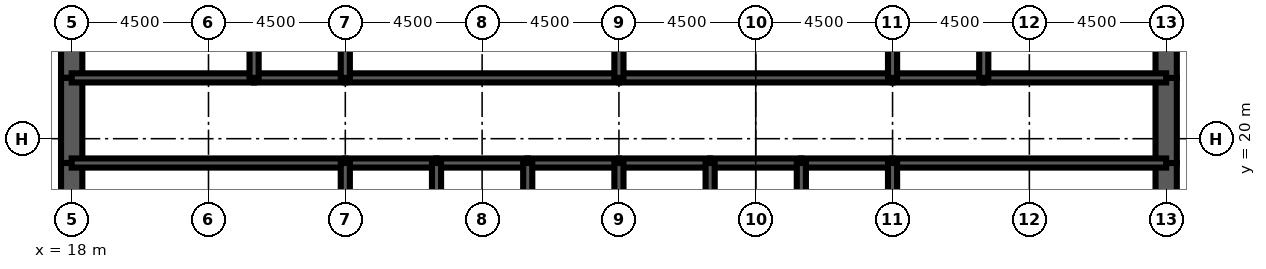
"""IFC4 building model, lengths in metres.
Left out: names, types, materials, properties, quantities, classifications, styles, units other than length and angle.
Written with IfcOpenShell. Run it as: python <this file> out.ifc"""

import sys

from ifc_helpers import new_model, si_unit, direction, frame, frame_2d, origin, place, context, subcontext, project, spatial, rectangle, extrude, element, fill, save


model = new_model("IFC4")
c1 = context("Model", 3, precision=1e-05, world=origin(), true_north=direction((0.0, 1.0)))
c2 = subcontext(c1, "Body", "Model", "MODEL_VIEW")
j1 = project(units=[si_unit("LENGTHUNIT", "METRE"), si_unit("PLANEANGLEUNIT", "RADIAN")], contexts=[c1])
p1 = place(None, origin())
s1 = spatial("IfcSite", under=j1, at=p1, CompositionType="ELEMENT")
p2 = place(p1, origin())
s2 = spatial("IfcBuilding", under=s1, at=p2, CompositionType="ELEMENT")
p3 = place(p2, frame((0.0, 0.0, 292.1)))
s3 = spatial("IfcBuildingStorey", under=s2, at=p3, CompositionType="ELEMENT", Elevation=292.1)
p4 = place(p3, frame((18.0, 26.0, 0.0), z_axis=(0.0, 0.0, 1.0), x_axis=(0.0, -1.0, 0.0)))
e1 = element("IfcWall", 1, at=p4, inside=s3, PredefinedType="SHEAR", context=c2, shape_type="SweptSolid", body=[
    extrude(rectangle(XDim=4.0, YDim=0.7, at=frame_2d((2.0, 0.0))), origin(), (0.0, 0.0, 1.0), 4.2),
])
p5 = place(p3, frame((18.0, 22.0, 0.0), z_axis=(0.0, 0.0, 1.0), x_axis=(0.0, -1.0, 0.0)))
e2 = element("IfcWall", 2, at=p5, inside=s3, PredefinedType="SHEAR", context=c2, shape_type="SweptSolid", body=[
    extrude(rectangle(XDim=2.8, YDim=0.7, at=frame_2d((1.4, 0.0))), origin(), (0.0, 0.0, 1.0), 4.2),
])
p6 = place(p5, frame((0.6, 0.0, 0.0)))
e3 = element("IfcOpeningElement", 3, at=p6, cuts=e2, PredefinedType="OPENING", context=c2, shape_type="SweptSolid", body=[
    extrude(rectangle(XDim=1.8, YDim=2.1, at=frame_2d((0.9, 1.05))), frame((0.0, 0.36, 0.0), z_axis=(0.0, -1.0, 0.0), x_axis=(1.0, 0.0, 0.0)), (0.0, 0.0, 1.0), 0.72),
])
for number, where, z_axis, x_axis in (
    (4, (18.0, 19.2, 0.0), (0.0, 0.0, 1.0), (0.0, -1.0, 0.0)),
    (5, (54.0, 16.0, 0.0), (0.0, 0.0, 1.0), (0.0, 1.0, 0.0)),
):
    element("IfcWall", number, at=place(p3, frame(where, z_axis=z_axis, x_axis=x_axis)), inside=s3, PredefinedType="SHEAR", context=c2, shape_type="SweptSolid", body=[
        extrude(rectangle(XDim=3.2, YDim=0.7, at=frame_2d((1.6, 0.0))), origin(), (0.0, 0.0, 1.0), 4.2),
    ])
p7 = place(p3, frame((54.0, 19.2, 0.0), z_axis=(0.0, 0.0, 1.0), x_axis=(0.0, 1.0, 0.0)))
e6 = element("IfcWall", 6, at=p7, inside=s3, PredefinedType="SHEAR", context=c2, shape_type="SweptSolid", body=[
    extrude(rectangle(XDim=2.8, YDim=0.7, at=frame_2d((1.4, 0.0))), origin(), (0.0, 0.0, 1.0), 4.2),
])
p8 = place(p7, frame((0.4, 0.0, 0.0)))
e7 = element("IfcOpeningElement", 7, at=p8, cuts=e6, PredefinedType="OPENING", context=c2, shape_type="SweptSolid", body=[
    extrude(rectangle(XDim=1.8, YDim=2.1, at=frame_2d((0.9, 1.05))), frame((0.0, 0.36, 0.0), z_axis=(0.0, -1.0, 0.0), x_axis=(1.0, 0.0, 0.0)), (0.0, 0.0, 1.0), 0.72),
])
p9 = place(p3, frame((54.0, 22.0, 0.0), z_axis=(0.0, 0.0, 1.0), x_axis=(0.0, 1.0, 0.0)))
e8 = element("IfcWall", 8, at=p9, inside=s3, PredefinedType="SHEAR", context=c2, shape_type="SweptSolid", body=[
    extrude(rectangle(XDim=4.0, YDim=0.7, at=frame_2d((2.0, 0.0))), origin(), (0.0, 0.0, 1.0), 4.2),
])
p10 = place(p3, frame((18.0, 19.2, 0.0), z_axis=(0.0, 0.0, 1.0), x_axis=(1.0, 0.0, 0.0)))
e9 = element("IfcWall", 9, at=p10, inside=s3, PredefinedType="SOLIDWALL", context=c2, shape_type="SweptSolid", body=[
    extrude(rectangle(XDim=9.0, YDim=0.3, at=frame_2d((4.5, 0.0))), origin(), (0.0, 0.0, 1.0), 4.2),
])
p11 = place(p10, frame((0.65, 0.0, 0.0)))
e10 = element("IfcOpeningElement", 10, at=p11, cuts=e9, PredefinedType="OPENING", context=c2, shape_type="SweptSolid", body=[
    extrude(rectangle(XDim=1.0, YDim=2.1, at=frame_2d((0.5, 1.05))), frame((0.0, 0.16, 0.0), z_axis=(0.0, -1.0, 0.0), x_axis=(1.0, 0.0, 0.0)), (0.0, 0.0, 1.0), 0.32),
])
p12 = place(p3, frame((27.0, 19.2, 0.0), z_axis=(0.0, 0.0, 1.0), x_axis=(1.0, 0.0, 0.0)))
e11 = element("IfcWall", 11, at=p12, inside=s3, PredefinedType="SOLIDWALL", context=c2, shape_type="SweptSolid", body=[
    extrude(rectangle(XDim=3.0, YDim=0.3, at=frame_2d((1.5, 0.0))), origin(), (0.0, 0.0, 1.0), 4.2),
])
p13 = place(p12, frame((0.95, 0.0, 0.0)))
e12 = element("IfcOpeningElement", 12, at=p13, cuts=e11, PredefinedType="OPENING", context=c2, shape_type="SweptSolid", body=[
    extrude(rectangle(XDim=1.1, YDim=2.2, at=frame_2d((0.55, 1.1))), frame((0.0, 0.16, 0.0), z_axis=(0.0, -1.0, 0.0), x_axis=(1.0, 0.0, 0.0)), (0.0, 0.0, 1.0), 0.32),
])
p14 = place(p3, frame((30.0, 19.2, 0.0), z_axis=(0.0, 0.0, 1.0), x_axis=(1.0, 0.0, 0.0)))
e13 = element("IfcWall", 13, at=p14, inside=s3, PredefinedType="SOLIDWALL", context=c2, shape_type="SweptSolid", body=[
    extrude(rectangle(XDim=3.0, YDim=0.3, at=frame_2d((1.5, 0.0))), origin(), (0.0, 0.0, 1.0), 4.2),
])
p15 = place(p14, frame((0.95, 0.0, 0.0)))
e14 = element("IfcOpeningElement", 14, at=p15, cuts=e13, PredefinedType="OPENING", context=c2, shape_type="SweptSolid", body=[
    extrude(rectangle(XDim=1.1, YDim=2.2, at=frame_2d((0.55, 1.1))), frame((0.0, 0.16, 0.0), z_axis=(0.0, -1.0, 0.0), x_axis=(1.0, 0.0, 0.0)), (0.0, 0.0, 1.0), 0.32),
])
p16 = place(p3, frame((33.0, 19.2, 0.0), z_axis=(0.0, 0.0, 1.0), x_axis=(1.0, 0.0, 0.0)))
e15 = element("IfcWall", 15, at=p16, inside=s3, PredefinedType="SOLIDWALL", context=c2, shape_type="SweptSolid", body=[
    extrude(rectangle(XDim=3.0, YDim=0.3, at=frame_2d((1.5, 0.0))), origin(), (0.0, 0.0, 1.0), 4.2),
])
p17 = place(p16, frame((0.95, 0.0, 0.0)))
e16 = element("IfcOpeningElement", 16, at=p17, cuts=e15, PredefinedType="OPENING", context=c2, shape_type="SweptSolid", body=[
    extrude(rectangle(XDim=1.1, YDim=2.2, at=frame_2d((0.55, 1.1))), frame((0.0, 0.16, 0.0), z_axis=(0.0, -1.0, 0.0), x_axis=(1.0, 0.0, 0.0)), (0.0, 0.0, 1.0), 0.32),
])
p18 = place(p3, frame((36.0, 19.2, 0.0), z_axis=(0.0, 0.0, 1.0), x_axis=(1.0, 0.0, 0.0)))
e17 = element("IfcWall", 17, at=p18, inside=s3, PredefinedType="SOLIDWALL", context=c2, shape_type="SweptSolid", body=[
    extrude(rectangle(XDim=3.0, YDim=0.3, at=frame_2d((1.5, 0.0))), origin(), (0.0, 0.0, 1.0), 4.2),
])
p19 = place(p18, frame((0.95, 0.0, 0.0)))
e18 = element("IfcOpeningElement", 18, at=p19, cuts=e17, PredefinedType="OPENING", context=c2, shape_type="SweptSolid", body=[
    extrude(rectangle(XDim=1.1, YDim=2.2, at=frame_2d((0.55, 1.1))), frame((0.0, 0.16, 0.0), z_axis=(0.0, -1.0, 0.0), x_axis=(1.0, 0.0, 0.0)), (0.0, 0.0, 1.0), 0.32),
])
p20 = place(p3, frame((39.0, 19.2, 0.0), z_axis=(0.0, 0.0, 1.0), x_axis=(1.0, 0.0, 0.0)))
e19 = element("IfcWall", 19, at=p20, inside=s3, PredefinedType="SOLIDWALL", context=c2, shape_type="SweptSolid", body=[
    extrude(rectangle(XDim=3.0, YDim=0.3, at=frame_2d((1.5, 0.0))), origin(), (0.0, 0.0, 1.0), 4.2),
])
p21 = place(p20, frame((1.0, 0.0, 0.0)))
e20 = element("IfcOpeningElement", 20, at=p21, cuts=e19, PredefinedType="OPENING", context=c2, shape_type="SweptSolid", body=[
    extrude(rectangle(XDim=1.0, YDim=2.1, at=frame_2d((0.5, 1.05))), frame((0.0, 0.16, 0.0), z_axis=(0.0, -1.0, 0.0), x_axis=(1.0, 0.0, 0.0)), (0.0, 0.0, 1.0), 0.32),
])
p22 = place(p3, frame((42.0, 19.2, 0.0), z_axis=(0.0, 0.0, 1.0), x_axis=(1.0, 0.0, 0.0)))
e21 = element("IfcWall", 21, at=p22, inside=s3, PredefinedType="SOLIDWALL", context=c2, shape_type="SweptSolid", body=[
    extrude(rectangle(XDim=3.0, YDim=0.3, at=frame_2d((1.5, 0.0))), origin(), (0.0, 0.0, 1.0), 4.2),
])
p23 = place(p22, frame((1.0, 0.0, 0.0)))
e22 = element("IfcOpeningElement", 22, at=p23, cuts=e21, PredefinedType="OPENING", context=c2, shape_type="SweptSolid", body=[
    extrude(rectangle(XDim=1.0, YDim=2.1, at=frame_2d((0.5, 1.05))), frame((0.0, 0.16, 0.0), z_axis=(0.0, -1.0, 0.0), x_axis=(1.0, 0.0, 0.0)), (0.0, 0.0, 1.0), 0.32),
])
p24 = place(p3, frame((45.0, 19.2, 0.0), z_axis=(0.0, 0.0, 1.0), x_axis=(1.0, 0.0, 0.0)))
e23 = element("IfcWall", 23, at=p24, inside=s3, PredefinedType="SOLIDWALL", context=c2, shape_type="SweptSolid", body=[
    extrude(rectangle(XDim=9.0, YDim=0.3, at=frame_2d((4.5, 0.0))), origin(), (0.0, 0.0, 1.0), 4.2),
])
p25 = place(p24, frame((7.35, 0.0, 0.0)))
e24 = element("IfcOpeningElement", 24, at=p25, cuts=e23, PredefinedType="OPENING", context=c2, shape_type="SweptSolid", body=[
    extrude(rectangle(XDim=1.0, YDim=2.1, at=frame_2d((0.5, 1.05))), frame((0.0, 0.16, 0.0), z_axis=(0.0, -1.0, 0.0), x_axis=(1.0, 0.0, 0.0)), (0.0, 0.0, 1.0), 0.32),
])
p26 = place(p3, frame((18.0, 22.0, 0.0), z_axis=(0.0, 0.0, 1.0), x_axis=(1.0, 0.0, 0.0)))
e25 = element("IfcWall", 25, at=p26, inside=s3, PredefinedType="SOLIDWALL", context=c2, shape_type="SweptSolid", body=[
    extrude(rectangle(XDim=6.0, YDim=0.3, at=frame_2d((3.0, 0.0))), origin(), (0.0, 0.0, 1.0), 4.2),
])
p27 = place(p26, frame((2.0, 0.0, 0.0)))
e26 = element("IfcOpeningElement", 26, at=p27, cuts=e25, PredefinedType="OPENING", context=c2, shape_type="SweptSolid", body=[
    extrude(rectangle(XDim=1.0, YDim=2.1, at=frame_2d((0.5, 1.05))), frame((0.0, 0.16, 0.0), z_axis=(0.0, -1.0, 0.0), x_axis=(1.0, 0.0, 0.0)), (0.0, 0.0, 1.0), 0.32),
])
p28 = place(p3, frame((24.0, 22.0, 0.0), z_axis=(0.0, 0.0, 1.0), x_axis=(1.0, 0.0, 0.0)))
e27 = element("IfcWall", 27, at=p28, inside=s3, PredefinedType="SOLIDWALL", context=c2, shape_type="SweptSolid", body=[
    extrude(rectangle(XDim=3.0, YDim=0.3, at=frame_2d((1.5, 0.0))), origin(), (0.0, 0.0, 1.0), 4.2),
])
p29 = place(p28, frame((1.0, 0.0, 0.0)))
e28 = element("IfcOpeningElement", 28, at=p29, cuts=e27, PredefinedType="OPENING", context=c2, shape_type="SweptSolid", body=[
    extrude(rectangle(XDim=1.0, YDim=2.1, at=frame_2d((0.5, 1.05))), frame((0.0, 0.16, 0.0), z_axis=(0.0, -1.0, 0.0), x_axis=(1.0, 0.0, 0.0)), (0.0, 0.0, 1.0), 0.32),
])
p30 = place(p3, frame((27.0, 22.0, 0.0), z_axis=(0.0, 0.0, 1.0), x_axis=(1.0, 0.0, 0.0)))
e29 = element("IfcWall", 29, at=p30, inside=s3, PredefinedType="SOLIDWALL", context=c2, shape_type="SweptSolid", body=[
    extrude(rectangle(XDim=9.0, YDim=0.3, at=frame_2d((4.5, 0.0))), origin(), (0.0, 0.0, 1.0), 4.2),
])
p31 = place(p30, frame((4.0, 0.0, 0.0)))
e30 = element("IfcOpeningElement", 30, at=p31, cuts=e29, PredefinedType="OPENING", context=c2, shape_type="SweptSolid", body=[
    extrude(rectangle(XDim=1.0, YDim=2.1, at=frame_2d((0.5, 1.05))), frame((0.0, 0.16, 0.0), z_axis=(0.0, -1.0, 0.0), x_axis=(1.0, 0.0, 0.0)), (0.0, 0.0, 1.0), 0.32),
])
p32 = place(p3, frame((36.0, 22.0, 0.0), z_axis=(0.0, 0.0, 1.0), x_axis=(1.0, 0.0, 0.0)))
e31 = element("IfcWall", 31, at=p32, inside=s3, PredefinedType="SOLIDWALL", context=c2, shape_type="SweptSolid", body=[
    extrude(rectangle(XDim=9.0, YDim=0.3, at=frame_2d((4.5, 0.0))), origin(), (0.0, 0.0, 1.0), 4.2),
])
p33 = place(p32, frame((4.0, 0.0, 0.0)))
e32 = element("IfcOpeningElement", 32, at=p33, cuts=e31, PredefinedType="OPENING", context=c2, shape_type="SweptSolid", body=[
    extrude(rectangle(XDim=1.0, YDim=2.1, at=frame_2d((0.5, 1.05))), frame((0.0, 0.16, 0.0), z_axis=(0.0, -1.0, 0.0), x_axis=(1.0, 0.0, 0.0)), (0.0, 0.0, 1.0), 0.32),
])
p34 = place(p3, frame((45.0, 22.0, 0.0), z_axis=(0.0, 0.0, 1.0), x_axis=(1.0, 0.0, 0.0)))
e33 = element("IfcWall", 33, at=p34, inside=s3, PredefinedType="SOLIDWALL", context=c2, shape_type="SweptSolid", body=[
    extrude(rectangle(XDim=3.0, YDim=0.3, at=frame_2d((1.5, 0.0))), origin(), (0.0, 0.0, 1.0), 4.2),
])
p35 = place(p34, frame((1.0, 0.0, 0.0)))
e34 = element("IfcOpeningElement", 34, at=p35, cuts=e33, PredefinedType="OPENING", context=c2, shape_type="SweptSolid", body=[
    extrude(rectangle(XDim=1.0, YDim=2.1, at=frame_2d((0.5, 1.05))), frame((0.0, 0.16, 0.0), z_axis=(0.0, -1.0, 0.0), x_axis=(1.0, 0.0, 0.0)), (0.0, 0.0, 1.0), 0.32),
])
p36 = place(p3, frame((48.0, 22.0, 0.0), z_axis=(0.0, 0.0, 1.0), x_axis=(1.0, 0.0, 0.0)))
e35 = element("IfcWall", 35, at=p36, inside=s3, PredefinedType="SOLIDWALL", context=c2, shape_type="SweptSolid", body=[
    extrude(rectangle(XDim=6.0, YDim=0.3, at=frame_2d((3.0, 0.0))), origin(), (0.0, 0.0, 1.0), 4.2),
])
p37 = place(p36, frame((2.0, 0.0, 0.0)))
e36 = element("IfcOpeningElement", 36, at=p37, cuts=e35, PredefinedType="OPENING", context=c2, shape_type="SweptSolid", body=[
    extrude(rectangle(XDim=1.0, YDim=2.1, at=frame_2d((0.5, 1.05))), frame((0.0, 0.16, 0.0), z_axis=(0.0, -1.0, 0.0), x_axis=(1.0, 0.0, 0.0)), (0.0, 0.0, 1.0), 0.32),
])
p38 = place(p36, frame((4.25, 0.0, 0.0)))
e37 = element("IfcOpeningElement", 37, at=p38, cuts=e35, PredefinedType="OPENING", context=c2, shape_type="SweptSolid", body=[
    extrude(rectangle(XDim=1.0, YDim=2.1, at=frame_2d((0.5, 1.05))), frame((0.0, 0.16, 0.0), z_axis=(0.0, -1.0, 0.0), x_axis=(1.0, 0.0, 0.0)), (0.0, 0.0, 1.0), 0.32),
])
for number, where, z_axis, x_axis in (
    (38, (27.0, 16.0, 0.0), (0.0, 0.0, 1.0), (0.0, 1.0, 0.0)),
    (39, (30.0, 16.0, 0.0), (0.0, 0.0, 1.0), (0.0, 1.0, 0.0)),
    (40, (33.0, 16.0, 0.0), (0.0, 0.0, 1.0), (0.0, 1.0, 0.0)),
    (41, (36.0, 16.0, 0.0), (0.0, 0.0, 1.0), (0.0, 1.0, 0.0)),
    (42, (39.0, 16.0, 0.0), (0.0, 0.0, 1.0), (0.0, 1.0, 0.0)),
    (43, (42.0, 16.0, 0.0), (0.0, 0.0, 1.0), (0.0, 1.0, 0.0)),
    (44, (45.0, 16.0, 0.0), (0.0, 0.0, 1.0), (0.0, 1.0, 0.0)),
):
    element("IfcWall", number, at=place(p3, frame(where, z_axis=z_axis, x_axis=x_axis)), inside=s3, PredefinedType="SOLIDWALL", context=c2, shape_type="SweptSolid", body=[
        extrude(rectangle(XDim=3.2, YDim=0.3, at=frame_2d((1.6, 0.0))), origin(), (0.0, 0.0, 1.0), 4.2),
    ])
for number, where, z_axis, x_axis in (
    (45, (24.0, 22.0, 0.0), (0.0, 0.0, 1.0), (0.0, 1.0, 0.0)),
    (46, (27.0, 22.0, 0.0), (0.0, 0.0, 1.0), (0.0, 1.0, 0.0)),
    (47, (36.0, 22.0, 0.0), (0.0, 0.0, 1.0), (0.0, 1.0, 0.0)),
    (48, (45.0, 22.0, 0.0), (0.0, 0.0, 1.0), (0.0, 1.0, 0.0)),
    (49, (48.0, 22.0, 0.0), (0.0, 0.0, 1.0), (0.0, 1.0, 0.0)),
):
    element("IfcWall", number, at=place(p3, frame(where, z_axis=z_axis, x_axis=x_axis)), inside=s3, PredefinedType="SOLIDWALL", context=c2, shape_type="SweptSolid", body=[
        extrude(rectangle(XDim=4.0, YDim=0.3, at=frame_2d((2.0, 0.0))), origin(), (0.0, 0.0, 1.0), 4.2),
    ])
p39 = place(p3, frame((39.0, 22.15, 0.0), z_axis=(0.0, 0.0, 1.0), x_axis=(0.0, 1.0, 0.0)))
e50 = element("IfcWall", 50, at=p39, inside=s3, PredefinedType="PARTITIONING", context=c2, shape_type="SweptSolid", body=[
    extrude(rectangle(XDim=3.7, YDim=0.15, at=frame_2d((1.85, 0.0))), origin(), (0.0, 0.0, 1.0), 3.0),
])
p40 = place(p39, frame((2.2, 0.0, 0.0)))
e51 = element("IfcOpeningElement", 51, at=p40, cuts=e50, PredefinedType="OPENING", context=c2, shape_type="SweptSolid", body=[
    extrude(rectangle(XDim=1.0, YDim=2.1, at=frame_2d((0.5, 1.05))), frame((0.0, 0.085, 0.0), z_axis=(0.0, -1.0, 0.0), x_axis=(1.0, 0.0, 0.0)), (0.0, 0.0, 1.0), 0.17),
])
p41 = place(p3, frame((51.775, 22.15, 0.0), z_axis=(0.0, 0.0, 1.0), x_axis=(0.0, 1.0, 0.0)))
e52 = element("IfcWall", 52, at=p41, inside=s3, PredefinedType="PARTITIONING", context=c2, shape_type="SweptSolid", body=[
    extrude(rectangle(XDim=3.7, YDim=0.15, at=frame_2d((1.85, 0.0))), origin(), (0.0, 0.0, 1.0), 3.0),
])
p42 = place(p13, origin())
e53 = element("IfcDoor", 53, at=p42, inside=s3, OperationType="DOUBLE_DOOR_SLIDING", PredefinedType="USERDEFINED", context=c2, shape_type="SweptSolid", body=[
    extrude(rectangle(XDim=1.1, YDim=2.2, at=frame_2d((0.55, 1.1))), frame((0.0, 0.025, 0.0), z_axis=(0.0, -1.0, 0.0), x_axis=(1.0, 0.0, 0.0)), (0.0, 0.0, 1.0), 0.05),
])
fill(e12, e53)
p43 = place(p15, origin())
e54 = element("IfcDoor", 54, at=p43, inside=s3, OperationType="DOUBLE_DOOR_SLIDING", PredefinedType="USERDEFINED", context=c2, shape_type="SweptSolid", body=[
    extrude(rectangle(XDim=1.1, YDim=2.2, at=frame_2d((0.55, 1.1))), frame((0.0, 0.025, 0.0), z_axis=(0.0, -1.0, 0.0), x_axis=(1.0, 0.0, 0.0)), (0.0, 0.0, 1.0), 0.05),
])
fill(e14, e54)
p44 = place(p17, origin())
e55 = element("IfcDoor", 55, at=p44, inside=s3, OperationType="DOUBLE_DOOR_SLIDING", PredefinedType="USERDEFINED", context=c2, shape_type="SweptSolid", body=[
    extrude(rectangle(XDim=1.1, YDim=2.2, at=frame_2d((0.55, 1.1))), frame((0.0, 0.025, 0.0), z_axis=(0.0, -1.0, 0.0), x_axis=(1.0, 0.0, 0.0)), (0.0, 0.0, 1.0), 0.05),
])
fill(e16, e55)
p45 = place(p19, origin())
e56 = element("IfcDoor", 56, at=p45, inside=s3, OperationType="DOUBLE_DOOR_SLIDING", PredefinedType="USERDEFINED", context=c2, shape_type="SweptSolid", body=[
    extrude(rectangle(XDim=1.1, YDim=2.2, at=frame_2d((0.55, 1.1))), frame((0.0, 0.025, 0.0), z_axis=(0.0, -1.0, 0.0), x_axis=(1.0, 0.0, 0.0)), (0.0, 0.0, 1.0), 0.05),
])
fill(e18, e56)
p46 = place(p11, origin())
e57 = element("IfcDoor", 57, at=p46, inside=s3, OperationType="SINGLE_SWING_LEFT", PredefinedType="DOOR", context=c2, shape_type="SweptSolid", body=[
    extrude(rectangle(XDim=1.0, YDim=2.1, at=frame_2d((0.5, 1.05))), frame((0.0, 0.025, 0.0), z_axis=(0.0, -1.0, 0.0), x_axis=(1.0, 0.0, 0.0)), (0.0, 0.0, 1.0), 0.05),
])
fill(e10, e57)
p47 = place(p25, origin())
e58 = element("IfcDoor", 58, at=p47, inside=s3, OperationType="SINGLE_SWING_RIGHT", PredefinedType="DOOR", context=c2, shape_type="SweptSolid", body=[
    extrude(rectangle(XDim=1.0, YDim=2.1, at=frame_2d((0.5, 1.05))), frame((0.0, 0.025, 0.0), z_axis=(0.0, -1.0, 0.0), x_axis=(1.0, 0.0, 0.0)), (0.0, 0.0, 1.0), 0.05),
])
fill(e24, e58)
p48 = place(p6, origin())
e59 = element("IfcDoor", 59, at=p48, inside=s3, OperationType="SINGLE_SWING_LEFT", PredefinedType="DOOR", context=c2, shape_type="SweptSolid", body=[
    extrude(rectangle(XDim=1.8, YDim=2.1, at=frame_2d((0.9, 1.05))), frame((0.0, 0.35, 0.0), z_axis=(0.0, -1.0, 0.0), x_axis=(1.0, 0.0, 0.0)), (0.0, 0.0, 1.0), 0.699),
])
fill(e3, e59)
p49 = place(p8, origin())
e60 = element("IfcDoor", 60, at=p49, inside=s3, OperationType="SINGLE_SWING_LEFT", PredefinedType="DOOR", context=c2, shape_type="SweptSolid", body=[
    extrude(rectangle(XDim=1.8, YDim=2.1, at=frame_2d((0.9, 1.05))), frame((0.0, 0.35, 0.0), z_axis=(0.0, -1.0, 0.0), x_axis=(1.0, 0.0, 0.0)), (0.0, 0.0, 1.0), 0.699),
])
fill(e7, e60)
p50 = place(p27, origin())
e61 = element("IfcDoor", 61, at=p50, inside=s3, OperationType="SINGLE_SWING_LEFT", PredefinedType="DOOR", context=c2, shape_type="SweptSolid", body=[
    extrude(rectangle(XDim=1.0, YDim=2.1, at=frame_2d((0.5, 1.05))), frame((0.0, 0.025, 0.0), z_axis=(0.0, -1.0, 0.0), x_axis=(1.0, 0.0, 0.0)), (0.0, 0.0, 1.0), 0.05),
])
fill(e26, e61)
p51 = place(p29, origin())
e62 = element("IfcDoor", 62, at=p51, inside=s3, OperationType="SINGLE_SWING_LEFT", PredefinedType="DOOR", context=c2, shape_type="SweptSolid", body=[
    extrude(rectangle(XDim=1.0, YDim=2.1, at=frame_2d((0.5, 1.05))), frame((0.0, 0.025, 0.0), z_axis=(0.0, -1.0, 0.0), x_axis=(1.0, 0.0, 0.0)), (0.0, 0.0, 1.0), 0.05),
])
fill(e28, e62)
p52 = place(p31, origin())
e63 = element("IfcDoor", 63, at=p52, inside=s3, OperationType="SINGLE_SWING_LEFT", PredefinedType="DOOR", context=c2, shape_type="SweptSolid", body=[
    extrude(rectangle(XDim=1.0, YDim=2.1, at=frame_2d((0.5, 1.05))), frame((0.0, 0.025, 0.0), z_axis=(0.0, -1.0, 0.0), x_axis=(1.0, 0.0, 0.0)), (0.0, 0.0, 1.0), 0.05),
])
fill(e30, e63)
p53 = place(p33, origin())
e64 = element("IfcDoor", 64, at=p53, inside=s3, OperationType="SINGLE_SWING_LEFT", PredefinedType="DOOR", context=c2, shape_type="SweptSolid", body=[
    extrude(rectangle(XDim=1.0, YDim=2.1, at=frame_2d((0.5, 1.05))), frame((0.0, 0.025, 0.0), z_axis=(0.0, -1.0, 0.0), x_axis=(1.0, 0.0, 0.0)), (0.0, 0.0, 1.0), 0.05),
])
fill(e32, e64)
p54 = place(p35, origin())
e65 = element("IfcDoor", 65, at=p54, inside=s3, OperationType="SINGLE_SWING_LEFT", PredefinedType="DOOR", context=c2, shape_type="SweptSolid", body=[
    extrude(rectangle(XDim=1.0, YDim=2.1, at=frame_2d((0.5, 1.05))), frame((0.0, 0.025, 0.0), z_axis=(0.0, -1.0, 0.0), x_axis=(1.0, 0.0, 0.0)), (0.0, 0.0, 1.0), 0.05),
])
fill(e34, e65)
p55 = place(p37, origin())
e66 = element("IfcDoor", 66, at=p55, inside=s3, OperationType="SINGLE_SWING_LEFT", PredefinedType="DOOR", context=c2, shape_type="SweptSolid", body=[
    extrude(rectangle(XDim=1.0, YDim=2.1, at=frame_2d((0.5, 1.05))), frame((0.0, 0.025, 0.0), z_axis=(0.0, -1.0, 0.0), x_axis=(1.0, 0.0, 0.0)), (0.0, 0.0, 1.0), 0.05),
])
fill(e36, e66)
p56 = place(p38, origin())
e67 = element("IfcDoor", 67, at=p56, inside=s3, OperationType="SINGLE_SWING_RIGHT", PredefinedType="DOOR", context=c2, shape_type="SweptSolid", body=[
    extrude(rectangle(XDim=1.0, YDim=2.1, at=frame_2d((0.5, 1.05))), frame((0.0, 0.025, 0.0), z_axis=(0.0, -1.0, 0.0), x_axis=(1.0, 0.0, 0.0)), (0.0, 0.0, 1.0), 0.05),
])
fill(e37, e67)
p57 = place(p21, origin())
e68 = element("IfcDoor", 68, at=p57, inside=s3, OperationType="SINGLE_SWING_LEFT", PredefinedType="DOOR", context=c2, shape_type="SweptSolid", body=[
    extrude(rectangle(XDim=1.0, YDim=2.1, at=frame_2d((0.5, 1.05))), frame((0.0, 0.025, 0.0), z_axis=(0.0, -1.0, 0.0), x_axis=(1.0, 0.0, 0.0)), (0.0, 0.0, 1.0), 0.05),
])
fill(e20, e68)
p58 = place(p23, origin())
e69 = element("IfcDoor", 69, at=p58, inside=s3, OperationType="SINGLE_SWING_LEFT", PredefinedType="DOOR", context=c2, shape_type="SweptSolid", body=[
    extrude(rectangle(XDim=1.0, YDim=2.1, at=frame_2d((0.5, 1.05))), frame((0.0, 0.025, 0.0), z_axis=(0.0, -1.0, 0.0), x_axis=(1.0, 0.0, 0.0)), (0.0, 0.0, 1.0), 0.05),
])
fill(e22, e69)
save(model, sys.argv[1])
